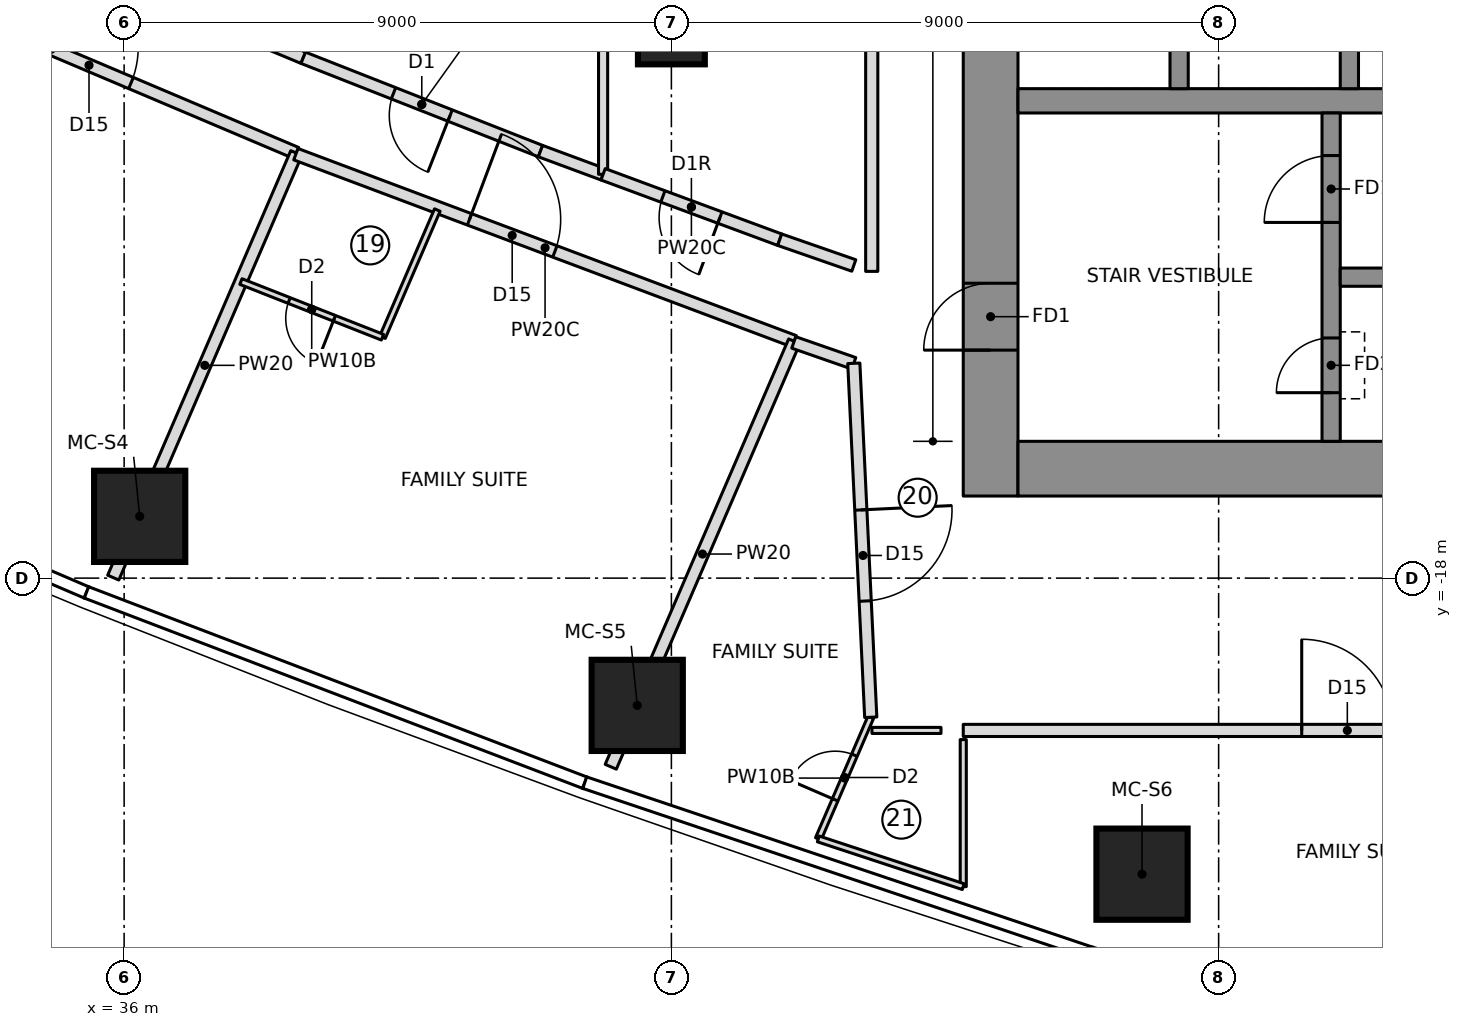
"""IFC4 building model, lengths in metres.
Left out: names, types, materials, properties, quantities, classifications, styles, units other than length and angle.
Written with IfcOpenShell. Run it as: python <this file> out.ifc"""

import sys

from ifc_helpers import new_model, si_unit, direction, frame, frame_2d, origin, origin_2d, place, context, subcontext, project, spatial, polyline, rectangle, outline, extrude, element, fill, save


model = new_model("IFC4")
c1 = context("Model", 3, precision=1e-05, world=origin(), true_north=direction((0.0, 1.0)))
c2 = subcontext(c1, "Body", "Model", "MODEL_VIEW")
j1 = project(units=[si_unit("LENGTHUNIT", "METRE"), si_unit("PLANEANGLEUNIT", "RADIAN")], contexts=[c1])
p1 = place(None, origin())
s1 = spatial("IfcSite", under=j1, at=p1, CompositionType="ELEMENT")
p2 = place(p1, origin())
s2 = spatial("IfcBuilding", under=s1, at=p2, CompositionType="ELEMENT")
p3 = place(p2, frame((0.0, 0.0, 155.05)))
s3 = spatial("IfcBuildingStorey", under=s2, at=p3, CompositionType="ELEMENT", Elevation=155.05)
p4 = place(p3, frame((50.25, -16.65, 0.0), z_axis=(0.0, 0.0, 1.0), x_axis=(0.0, 1.0, 0.0)))
e1 = element("IfcWall", 1, at=p4, inside=s3, PredefinedType="SHEAR", context=c2, shape_type="SweptSolid", body=[
    extrude(rectangle(XDim=10.0, YDim=0.9, at=frame_2d((5.0, 0.0))), origin(), (0.0, 0.0, 1.0), 3.55),
])
p5 = place(p4, frame((2.4, 0.0, 0.0)))
e2 = element("IfcOpeningElement", 2, at=p5, cuts=e1, PredefinedType="OPENING", context=c2, shape_type="SweptSolid", body=[
    extrude(rectangle(XDim=1.1, YDim=2.1, at=frame_2d((0.55, 1.05))), frame((0.0, 0.46, 0.0), z_axis=(0.0, -1.0, 0.0), x_axis=(1.0, 0.0, 0.0)), (0.0, 0.0, 1.0), 0.92),
])
p6 = place(p3, frame((50.7, -16.2, 0.0), z_axis=(0.0, 0.0, 1.0), x_axis=(1.0, 0.0, 0.0)))
e3 = element("IfcWall", 3, at=p6, inside=s3, PredefinedType="SHEAR", context=c2, shape_type="SweptSolid", body=[
    extrude(rectangle(XDim=13.92, YDim=0.9, at=frame_2d((6.96, 0.0))), origin(), (0.0, 0.0, 1.0), 3.55),
])
p7 = place(p3, frame((50.7, -10.15, 0.0), z_axis=(0.0, 0.0, 1.0), x_axis=(1.0, 0.0, 0.0)))
e4 = element("IfcWall", 4, at=p7, inside=s3, PredefinedType="SHEAR", context=c2, shape_type="SweptSolid", body=[
    extrude(rectangle(XDim=13.02, YDim=0.4, at=frame_2d((6.51, 0.0))), origin(), (0.0, 0.0, 1.0), 3.55),
])
for number, where, z_axis, x_axis in (
    (5, (53.35, -9.95, 0.0), (0.0, 0.0, 1.0), (0.0, 1.0, 0.0)),
    (6, (56.15, -9.95, 0.0), (0.0, 0.0, 1.0), (0.0, 1.0, 0.0)),
):
    element("IfcWall", number, at=place(p3, frame(where, z_axis=z_axis, x_axis=x_axis)), inside=s3, PredefinedType="SHEAR", context=c2, shape_type="SweptSolid", body=[
        extrude(rectangle(XDim=3.0, YDim=0.3, at=frame_2d((1.5, 0.0))), origin(), (0.0, 0.0, 1.0), 3.55),
    ])
p8 = place(p3, frame((55.85, -15.75, 0.0), z_axis=(0.0, 0.0, 1.0), x_axis=(0.0, 1.0, 0.0)))
e7 = element("IfcWall", 7, at=p8, inside=s3, PredefinedType="SHEAR", context=c2, shape_type="SweptSolid", body=[
    extrude(rectangle(XDim=5.4, YDim=0.3, at=frame_2d((2.7, 0.0))), origin(), (0.0, 0.0, 1.0), 3.55),
])
p9 = place(p8, frame((3.6, 0.0, 0.0)))
e8 = element("IfcOpeningElement", 8, at=p9, cuts=e7, PredefinedType="OPENING", context=c2, shape_type="SweptSolid", body=[
    extrude(rectangle(XDim=1.1, YDim=2.1, at=frame_2d((0.55, 1.05))), frame((0.0, 0.16, 0.0), z_axis=(0.0, -1.0, 0.0), x_axis=(1.0, 0.0, 0.0)), (0.0, 0.0, 1.0), 0.32),
])
p10 = place(p8, frame((0.8, 0.0, 0.0)))
e9 = element("IfcOpeningElement", 9, at=p10, cuts=e7, PredefinedType="OPENING", context=c2, shape_type="SweptSolid", body=[
    extrude(rectangle(XDim=0.9, YDim=2.1, at=frame_2d((0.45, 1.05))), frame((0.0, 0.16, 0.0), z_axis=(0.0, -1.0, 0.0), x_axis=(1.0, 0.0, 0.0)), (0.0, 0.0, 1.0), 0.32),
])
p11 = place(p3, frame((56.0, -13.05, 0.0), z_axis=(0.0, 0.0, 1.0), x_axis=(1.0, 0.0, 0.0)))
e10 = element("IfcWall", 10, at=p11, inside=s3, PredefinedType="SHEAR", context=c2, shape_type="SweptSolid", body=[
    extrude(rectangle(XDim=7.72, YDim=0.3, at=frame_2d((3.86, 0.0))), origin(), (0.0, 0.0, 1.0), 3.55),
])
for number, where, z_axis, x_axis in (
    (11, (36.256, -16.984, 0.0), (0.0, 0.0, 1.0), (1.0, 0.0, 0.0)),
    (12, (44.438, -20.093, 0.0), (0.0, 0.0, 1.0), (1.0, 0.0, 0.0)),
    (13, (52.74, -22.869, 0.0), (0.0, 0.0, 1.0), (1.0, 0.0, 0.0)),
):
    element("IfcColumn", number, at=place(p3, frame(where, z_axis=z_axis, x_axis=x_axis)), inside=s3, PredefinedType="COLUMN", context=c2, shape_type="SweptSolid", body=[
        extrude(rectangle(XDim=1.5, YDim=1.5, at=origin_2d()), origin(), (0.0, 0.0, 1.0), 3.55),
    ])
p12 = place(p3, frame((45.0, -9.0, 0.0), z_axis=(0.0, 0.0, 1.0), x_axis=(1.0, 0.0, 0.0)))
e14 = element("IfcColumn", 14, at=p12, inside=s3, PredefinedType="COLUMN", context=c2, shape_type="SweptSolid", body=[
    extrude(rectangle(XDim=1.1, YDim=1.1, at=origin_2d()), origin(), (0.0, 0.0, 1.0), 3.55),
])
p13 = place(p3, frame((51.859, -24.257, 0.0), z_axis=(0.0, 0.0, 1.0), x_axis=(0.956964488344, -0.290205044837, 0.0)))
e15 = element("IfcWall", 15, at=p13, inside=s3, PredefinedType="NOTDEFINED", context=c2, shape_type="SweptSolid", body=[
    extrude(outline(polyline([(0.0, -0.2), (4.418, -0.2), (4.357, 0.2), (0.0, 0.2), (0.0, -0.2)])), origin(), (0.0, 0.0, 1.0), 3.25),
])
p14 = place(p13, frame((0.994, 0.0, 0.5)))
e16 = element("IfcOpeningElement", 16, at=p14, cuts=e15, PredefinedType="OPENING", context=c2, shape_type="SweptSolid", body=[
    extrude(rectangle(XDim=2.4, YDim=2.0, at=frame_2d((1.2, 1.0))), frame((0.0, 0.21, 0.0), z_axis=(0.0, -1.0, 0.0), x_axis=(1.0, 0.0, 0.0)), (0.0, 0.0, 1.0), 0.42),
])
p15 = place(p3, frame((30.772, -7.594, 0.0), z_axis=(0.0, 0.0, 1.0), x_axis=(0.920747305421, -0.390159454019, 0.0)))
e17 = element("IfcWall", 17, at=p15, inside=s3, PredefinedType="PARTITIONING", context=c2, shape_type="SweptSolid", body=[
    extrude(rectangle(XDim=8.754, YDim=0.2, at=frame_2d((4.377, 0.0))), origin(), (0.0, 0.0, 1.0), 3.25),
])
p16 = place(p15, frame((4.3, 0.0, 0.0)))
e18 = element("IfcOpeningElement", 18, at=p16, cuts=e17, PredefinedType="OPENING", context=c2, shape_type="SweptSolid", body=[
    extrude(rectangle(XDim=1.5, YDim=2.1, at=frame_2d((0.75, 1.05))), frame((0.0, 0.11, 0.0), z_axis=(0.0, -1.0, 0.0), x_axis=(1.0, 0.0, 0.0)), (0.0, 0.0, 1.0), 0.22),
])
p17 = place(p3, frame((35.821, -17.991, 0.0), z_axis=(0.0, 0.0, 1.0), x_axis=(0.395987603644, 0.918255856371, 0.0)))
e19 = element("IfcWall", 19, at=p17, inside=s3, PredefinedType="PARTITIONING", context=c2, shape_type="SweptSolid", body=[
    extrude(rectangle(XDim=7.604, YDim=0.2, at=frame_2d((3.802, 0.0))), origin(), (0.0, 0.0, 1.0), 3.25),
])
p18 = place(p3, frame((38.824, -11.028, 0.0), z_axis=(0.0, 0.0, 1.0), x_axis=(0.936174374451, -0.351535973439, 0.0)))
e20 = element("IfcWall", 20, at=p18, inside=s3, PredefinedType="PARTITIONING", context=c2, shape_type="SweptSolid", body=[
    extrude(rectangle(XDim=8.755, YDim=0.2, at=frame_2d((4.377, 0.0))), origin(), (0.0, 0.0, 1.0), 3.25),
])
p19 = place(p18, frame((3.05, 0.0, 0.0)))
e21 = element("IfcOpeningElement", 21, at=p19, cuts=e20, PredefinedType="OPENING", context=c2, shape_type="SweptSolid", body=[
    extrude(rectangle(XDim=1.5, YDim=2.1, at=frame_2d((0.75, 1.05))), frame((0.0, 0.11, 0.0), z_axis=(0.0, -1.0, 0.0), x_axis=(1.0, 0.0, 0.0)), (0.0, 0.0, 1.0), 0.22),
])
p20 = place(p3, frame((41.151, -11.946, 0.0), z_axis=(0.0, 0.0, 1.0), x_axis=(-0.39596178423, -0.918266990275, 0.0)))
e22 = element("IfcWall", 22, at=p20, inside=s3, PredefinedType="PARTITIONING", context=c2, shape_type="SweptSolid", body=[
    extrude(rectangle(XDim=2.278, YDim=0.1, at=frame_2d((1.139, 0.0))), origin(), (0.0, 0.0, 1.0), 3.25),
])
p21 = place(p3, frame((40.249, -14.038, 0.0), z_axis=(0.0, 0.0, 1.0), x_axis=(-0.930555592459, 0.366150637503, 0.0)))
e23 = element("IfcWall", 23, at=p21, inside=s3, PredefinedType="PARTITIONING", context=c2, shape_type="SweptSolid", body=[
    extrude(rectangle(XDim=2.501, YDim=0.1, at=frame_2d((1.25, 0.0))), origin(), (0.0, 0.0, 1.0), 3.25),
])
p22 = place(p21, frame((0.85, 0.0, 0.0)))
e24 = element("IfcOpeningElement", 24, at=p22, cuts=e23, PredefinedType="OPENING", context=c2, shape_type="SweptSolid", body=[
    extrude(rectangle(XDim=0.8, YDim=2.1, at=frame_2d((0.4, 1.05))), frame((0.0, 0.06, 0.0), z_axis=(0.0, -1.0, 0.0), x_axis=(1.0, 0.0, 0.0)), (0.0, 0.0, 1.0), 0.12),
])
p23 = place(p3, frame((44.003, -21.102, 0.0), z_axis=(0.0, 0.0, 1.0), x_axis=(0.39600636385, 0.918247766014, 0.0)))
e25 = element("IfcWall", 25, at=p23, inside=s3, PredefinedType="PARTITIONING", context=c2, shape_type="SweptSolid", body=[
    extrude(rectangle(XDim=7.62, YDim=0.2, at=frame_2d((3.81, 0.0))), origin(), (0.0, 0.0, 1.0), 3.25),
])
p24 = place(p3, frame((47.416, -22.289, 0.0), z_axis=(0.0, 0.0, 1.0), x_axis=(0.396028123143, 0.918238381729, 0.0)))
e26 = element("IfcWall", 26, at=p24, inside=s3, PredefinedType="PARTITIONING", context=c2, shape_type="SweptSolid", body=[
    extrude(rectangle(XDim=2.179, YDim=0.1, at=frame_2d((1.089, 0.0))), origin(), (0.0, 0.0, 1.0), 3.25),
])
p25 = place(p24, frame((0.7, 0.0, 0.0)))
e27 = element("IfcOpeningElement", 27, at=p25, cuts=e26, PredefinedType="OPENING", context=c2, shape_type="SweptSolid", body=[
    extrude(rectangle(XDim=0.8, YDim=2.1, at=frame_2d((0.4, 1.05))), frame((0.0, 0.06, 0.0), z_axis=(0.0, -1.0, 0.0), x_axis=(1.0, 0.0, 0.0)), (0.0, 0.0, 1.0), 0.12),
])
p26 = place(p3, frame((42.847, -10.977, 0.0), z_axis=(0.0, 0.0, 1.0), x_axis=(-0.930576677263, 0.36609704688, 0.0)))
e28 = element("IfcWall", 28, at=p26, inside=s3, PredefinedType="PARTITIONING", context=c2, shape_type="SweptSolid", body=[
    extrude(rectangle(XDim=4.195, YDim=0.2, at=frame_2d((2.098, 0.0))), origin(), (0.0, 0.0, 1.0), 3.25),
])
p27 = place(p26, frame((1.598, 0.0, 0.0)))
e29 = element("IfcOpeningElement", 29, at=p27, cuts=e28, PredefinedType="OPENING", context=c2, shape_type="SweptSolid", body=[
    extrude(rectangle(XDim=1.0, YDim=2.1, at=frame_2d((0.5, 1.05))), frame((0.0, 0.11, 0.0), z_axis=(0.0, -1.0, 0.0), x_axis=(1.0, 0.0, 0.0)), (0.0, 0.0, 1.0), 0.22),
])
p28 = place(p3, frame((43.877, -11.358, 0.0), z_axis=(0.0, 0.0, 1.0), x_axis=(-0.93771926553, 0.347393982466, 0.0)))
e30 = element("IfcWall", 30, at=p28, inside=s3, PredefinedType="PARTITIONING", context=c2, shape_type="SweptSolid", body=[
    extrude(rectangle(XDim=1.098, YDim=0.2, at=frame_2d((0.549, 0.0))), origin(), (0.0, 0.0, 1.0), 3.25),
])
p29 = place(p3, frame((38.943, -9.441, 0.0), z_axis=(0.0, 0.0, 1.0), x_axis=(-0.923005630596, 0.384786441923, 0.0)))
e31 = element("IfcWall", 31, at=p29, inside=s3, PredefinedType="PARTITIONING", context=c2, shape_type="SweptSolid", body=[
    extrude(rectangle(XDim=3.243, YDim=0.2, at=frame_2d((1.622, 0.0))), origin(), (0.0, 0.0, 1.0), 3.25),
])
p30 = place(p3, frame((43.877, -11.358, 0.0), z_axis=(0.0, 0.0, 1.0), x_axis=(0.0, 1.0, 0.0)))
e32 = element("IfcWall", 32, at=p30, inside=s3, PredefinedType="PARTITIONING", context=c2, shape_type="SweptSolid", body=[
    extrude(rectangle(XDim=22.717, YDim=0.15, at=frame_2d((11.358, 0.0))), origin(), (0.0, 0.0, 1.0), 3.25),
])
p31 = place(p3, frame((46.781, -12.434, 0.0), z_axis=(0.0, 0.0, 1.0), x_axis=(-0.937737348698, 0.347345166739, 0.0)))
e33 = element("IfcWall", 33, at=p31, inside=s3, PredefinedType="PARTITIONING", context=c2, shape_type="SweptSolid", body=[
    extrude(rectangle(XDim=3.097, YDim=0.2, at=frame_2d((1.548, 0.0))), origin(), (0.0, 0.0, 1.0), 3.25),
])
p32 = place(p31, frame((1.049, 0.0, 0.0)))
e34 = element("IfcOpeningElement", 34, at=p32, cuts=e33, PredefinedType="OPENING", context=c2, shape_type="SweptSolid", body=[
    extrude(rectangle(XDim=1.0, YDim=2.1, at=frame_2d((0.5, 1.05))), frame((0.0, 0.11, 0.0), z_axis=(0.0, -1.0, 0.0), x_axis=(1.0, 0.0, 0.0)), (0.0, 0.0, 1.0), 0.22),
])
p33 = place(p3, frame((49.8, -20.505, 0.0), z_axis=(0.0, 0.0, 1.0), x_axis=(1.0, 0.0, 0.0)))
e35 = element("IfcWall", 35, at=p33, inside=s3, PredefinedType="PARTITIONING", context=c2, shape_type="SweptSolid", body=[
    extrude(rectangle(XDim=12.133, YDim=0.2, at=frame_2d((6.066, 0.0))), origin(), (0.0, 0.0, 1.0), 3.25),
])
p34 = place(p33, frame((5.566, 0.0, 0.0)))
e36 = element("IfcOpeningElement", 36, at=p34, cuts=e35, PredefinedType="OPENING", context=c2, shape_type="SweptSolid", body=[
    extrude(rectangle(XDim=1.5, YDim=2.1, at=frame_2d((0.75, 1.05))), frame((0.0, 0.11, 0.0), z_axis=(0.0, -1.0, 0.0), x_axis=(1.0, 0.0, 0.0)), (0.0, 0.0, 1.0), 0.22),
])
p35 = place(p3, frame((48.299, -20.505, 0.0), z_axis=(0.0, 0.0, 1.0), x_axis=(1.0, 0.0, 0.0)))
e37 = element("IfcWall", 37, at=p35, inside=s3, PredefinedType="PARTITIONING", context=c2, shape_type="SweptSolid", body=[
    extrude(rectangle(XDim=1.135, YDim=0.1, at=frame_2d((0.568, 0.0))), origin(), (0.0, 0.0, 1.0), 3.25),
])
p36 = place(p3, frame((49.8, -20.656, 0.0), z_axis=(0.0, 0.0, 1.0), x_axis=(0.0, -1.0, 0.0)))
e38 = element("IfcWall", 38, at=p36, inside=s3, PredefinedType="PARTITIONING", context=c2, shape_type="SweptSolid", body=[
    extrude(rectangle(XDim=2.418, YDim=0.1, at=frame_2d((1.209, 0.0))), origin(), (0.0, 0.0, 1.0), 3.25),
])
p37 = place(p3, frame((49.8, -23.074, 0.0), z_axis=(0.0, 0.0, 1.0), x_axis=(-0.949844078437, 0.312723882455, 0.0)))
e39 = element("IfcWall", 39, at=p37, inside=s3, PredefinedType="PARTITIONING", context=c2, shape_type="SweptSolid", body=[
    extrude(rectangle(XDim=2.51, YDim=0.1, at=frame_2d((1.255, 0.0))), origin(), (0.0, 0.0, 1.0), 3.25),
])
p38 = place(p3, frame((47.012, -14.124, 0.0), z_axis=(0.0, 0.0, 1.0), x_axis=(0.944566081842, -0.32832136244, 0.0)))
e40 = element("IfcWall", 40, at=p38, inside=s3, PredefinedType="PARTITIONING", context=c2, shape_type="SweptSolid", body=[
    extrude(rectangle(XDim=1.045, YDim=0.2, at=frame_2d((0.523, 0.0))), origin(), (0.0, 0.0, 1.0), 3.25),
])
p39 = place(p3, frame((48.0, -12.858, 0.0), z_axis=(0.0, 0.0, 1.0), x_axis=(-0.944517215109, 0.328461916152, 0.0)))
e41 = element("IfcWall", 41, at=p39, inside=s3, PredefinedType="PARTITIONING", context=c2, shape_type="SweptSolid", body=[
    extrude(rectangle(XDim=1.29, YDim=0.2, at=frame_2d((0.645, 0.0))), origin(), (0.0, 0.0, 1.0), 3.25),
])
p40 = place(p3, frame((48.0, -14.467, 0.0), z_axis=(0.0, 0.0, 1.0), x_axis=(0.047837808481, -0.998855116661, 0.0)))
e42 = element("IfcWall", 42, at=p40, inside=s3, PredefinedType="PARTITIONING", context=c2, shape_type="SweptSolid", body=[
    extrude(rectangle(XDim=5.828, YDim=0.2, at=frame_2d((2.914, 0.0))), origin(), (0.0, 0.0, 1.0), 3.25),
])
p41 = place(p40, frame((2.414, 0.0, 0.0)))
e43 = element("IfcOpeningElement", 43, at=p41, cuts=e42, PredefinedType="OPENING", context=c2, shape_type="SweptSolid", body=[
    extrude(rectangle(XDim=1.5, YDim=2.1, at=frame_2d((0.75, 1.05))), frame((0.0, 0.11, 0.0), z_axis=(0.0, -1.0, 0.0), x_axis=(1.0, 0.0, 0.0)), (0.0, 0.0, 1.0), 0.22),
])
p42 = place(p3, frame((48.295, 12.955, 0.0), z_axis=(0.0, 0.0, 1.0), x_axis=(0.0, -1.0, 0.0)))
e44 = element("IfcWall", 44, at=p42, inside=s3, PredefinedType="PARTITIONING", context=c2, shape_type="SweptSolid", body=[
    extrude(rectangle(XDim=25.91, YDim=0.2, at=frame_2d((12.955, 0.0))), origin(), (0.0, 0.0, 1.0), 3.25),
])
p43 = place(p16, origin())
e45 = element("IfcDoor", 45, at=p43, inside=s3, OperationType="DOUBLE_DOOR_SINGLE_SWING", PredefinedType="DOOR", context=c2, shape_type="SweptSolid", body=[
    extrude(rectangle(XDim=1.5, YDim=2.1, at=frame_2d((0.75, 1.05))), frame((0.0, 0.025, 0.0), z_axis=(0.0, -1.0, 0.0), x_axis=(1.0, 0.0, 0.0)), (0.0, 0.0, 1.0), 0.05),
])
fill(e18, e45)
p44 = place(p22, origin())
e46 = element("IfcDoor", 46, at=p44, inside=s3, OperationType="SINGLE_SWING_LEFT", PredefinedType="DOOR", context=c2, shape_type="SweptSolid", body=[
    extrude(rectangle(XDim=0.8, YDim=2.1, at=frame_2d((0.4, 1.05))), frame((0.0, 0.025, 0.0), z_axis=(0.0, -1.0, 0.0), x_axis=(1.0, 0.0, 0.0)), (0.0, 0.0, 1.0), 0.05),
])
fill(e24, e46)
p45 = place(p19, origin())
e47 = element("IfcDoor", 47, at=p45, inside=s3, OperationType="DOUBLE_DOOR_SINGLE_SWING", PredefinedType="DOOR", context=c2, shape_type="SweptSolid", body=[
    extrude(rectangle(XDim=1.5, YDim=2.1, at=frame_2d((0.75, 1.05))), frame((0.0, 0.025, 0.0), z_axis=(0.0, -1.0, 0.0), x_axis=(1.0, 0.0, 0.0)), (0.0, 0.0, 1.0), 0.05),
])
fill(e21, e47)
p46 = place(p25, origin())
e48 = element("IfcDoor", 48, at=p46, inside=s3, OperationType="SINGLE_SWING_LEFT", PredefinedType="DOOR", context=c2, shape_type="SweptSolid", body=[
    extrude(rectangle(XDim=0.8, YDim=2.1, at=frame_2d((0.4, 1.05))), frame((0.0, 0.025, 0.0), z_axis=(0.0, -1.0, 0.0), x_axis=(1.0, 0.0, 0.0)), (0.0, 0.0, 1.0), 0.05),
])
fill(e27, e48)
p47 = place(p27, origin())
e49 = element("IfcDoor", 49, at=p47, inside=s3, OperationType="SINGLE_SWING_LEFT", PredefinedType="DOOR", context=c2, shape_type="SweptSolid", body=[
    extrude(rectangle(XDim=1.0, YDim=2.1, at=frame_2d((0.5, 1.05))), frame((0.0, 0.025, 0.0), z_axis=(0.0, -1.0, 0.0), x_axis=(1.0, 0.0, 0.0)), (0.0, 0.0, 1.0), 0.05),
])
fill(e29, e49)
p48 = place(p32, origin())
e50 = element("IfcDoor", 50, at=p48, inside=s3, OperationType="SINGLE_SWING_RIGHT", PredefinedType="DOOR", context=c2, shape_type="SweptSolid", body=[
    extrude(rectangle(XDim=1.0, YDim=2.1, at=frame_2d((0.5, 1.05))), frame((0.0, 0.025, 0.0), z_axis=(0.0, -1.0, 0.0), x_axis=(1.0, 0.0, 0.0)), (0.0, 0.0, 1.0), 0.05),
])
fill(e34, e50)
p49 = place(p34, origin())
e51 = element("IfcDoor", 51, at=p49, inside=s3, OperationType="DOUBLE_DOOR_SINGLE_SWING", PredefinedType="DOOR", context=c2, shape_type="SweptSolid", body=[
    extrude(rectangle(XDim=1.5, YDim=2.1, at=frame_2d((0.75, 1.05))), frame((0.0, 0.025, 0.0), z_axis=(0.0, -1.0, 0.0), x_axis=(1.0, 0.0, 0.0)), (0.0, 0.0, 1.0), 0.05),
])
fill(e36, e51)
p50 = place(p41, origin())
e52 = element("IfcDoor", 52, at=p50, inside=s3, OperationType="DOUBLE_DOOR_SINGLE_SWING", PredefinedType="DOOR", context=c2, shape_type="SweptSolid", body=[
    extrude(rectangle(XDim=1.5, YDim=2.1, at=frame_2d((0.75, 1.05))), frame((0.0, 0.025, 0.0), z_axis=(0.0, -1.0, 0.0), x_axis=(1.0, 0.0, 0.0)), (0.0, 0.0, 1.0), 0.05),
])
fill(e43, e52)
p51 = place(p9, origin())
e53 = element("IfcDoor", 53, at=p51, inside=s3, OperationType="SINGLE_SWING_RIGHT", PredefinedType="DOOR", context=c2, shape_type="SweptSolid", body=[
    extrude(rectangle(XDim=1.1, YDim=2.1, at=frame_2d((0.55, 1.05))), frame((0.0, 0.025, 0.0), z_axis=(0.0, -1.0, 0.0), x_axis=(1.0, 0.0, 0.0)), (0.0, 0.0, 1.0), 0.05),
])
fill(e8, e53)
p52 = place(p5, origin())
e54 = element("IfcDoor", 54, at=p52, inside=s3, OperationType="SINGLE_SWING_RIGHT", PredefinedType="DOOR", context=c2, shape_type="SweptSolid", body=[
    extrude(rectangle(XDim=1.1, YDim=2.1, at=frame_2d((0.55, 1.05))), frame((0.0, 0.025, 0.0), z_axis=(0.0, -1.0, 0.0), x_axis=(1.0, 0.0, 0.0)), (0.0, 0.0, 1.0), 0.05),
])
fill(e2, e54)
p53 = place(p10, origin())
e55 = element("IfcDoor", 55, at=p53, inside=s3, OperationType="SINGLE_SWING_LEFT", PredefinedType="DOOR", context=c2, shape_type="SweptSolid", body=[
    extrude(rectangle(XDim=0.9, YDim=2.1, at=frame_2d((0.45, 1.05))), frame((0.0, 0.025, 0.0), z_axis=(0.0, -1.0, 0.0), x_axis=(1.0, 0.0, 0.0)), (0.0, 0.0, 1.0), 0.05),
])
fill(e9, e55)
save(model, sys.argv[1])
